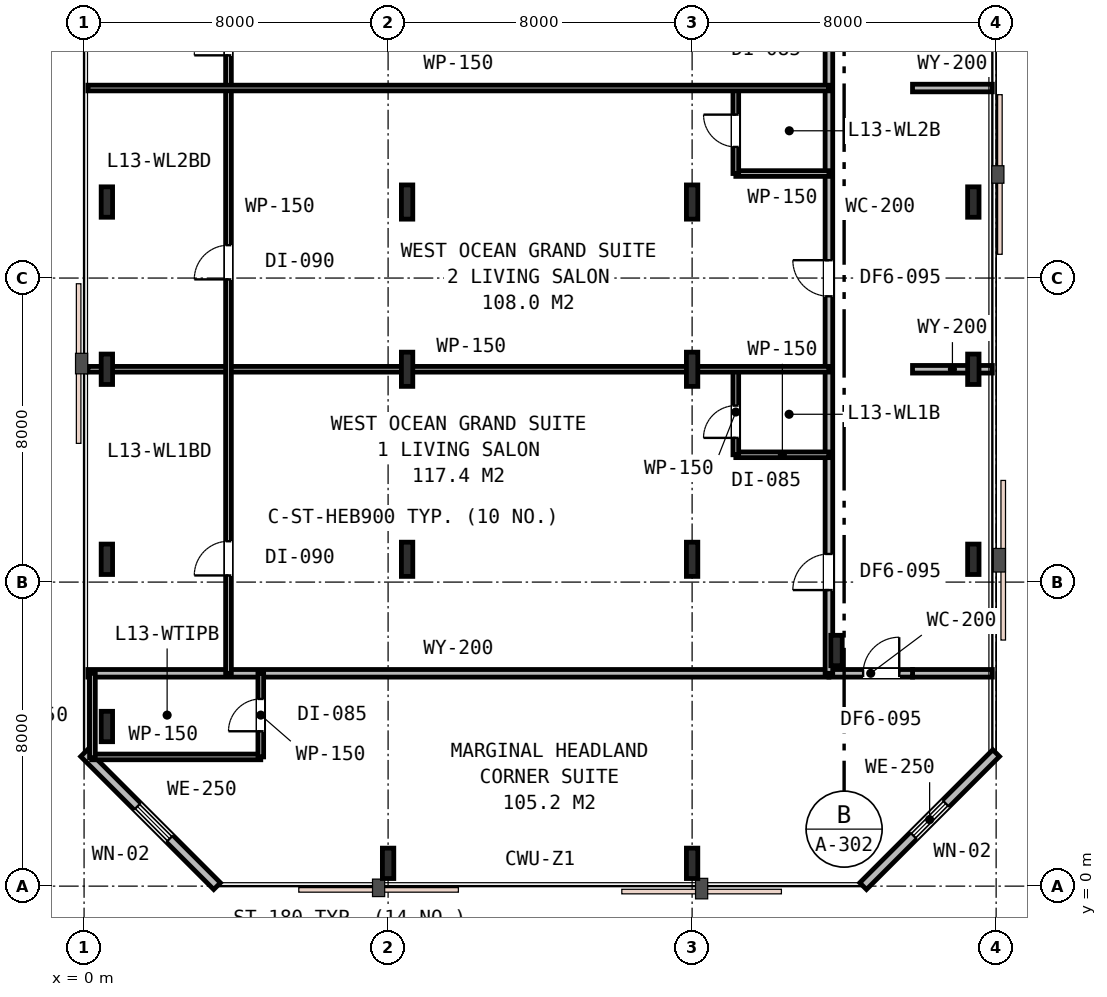
"""IFC4 building model, lengths in metres.
Left out: names, types, materials, properties, quantities, classifications, styles, units other than length and angle.
Written with IfcOpenShell. Run it as: python <this file> out.ifc"""

import sys

from ifc_helpers import new_model, si_unit, direction, frame, frame_2d, origin, origin_2d, place, context, subcontext, project, spatial, rectangle, i_section, extrude, element, fill, save


model = new_model("IFC4")
c1 = context("Model", 3, precision=1e-05, world=origin(), true_north=direction((0.0, 1.0)))
c2 = subcontext(c1, "Body", "Model", "MODEL_VIEW")
j1 = project(units=[si_unit("LENGTHUNIT", "METRE"), si_unit("PLANEANGLEUNIT", "RADIAN")], contexts=[c1])
p1 = place(None, origin())
s1 = spatial("IfcSite", under=j1, at=p1, CompositionType="ELEMENT")
p2 = place(p1, origin())
s2 = spatial("IfcBuilding", under=s1, at=p2, CompositionType="ELEMENT")
p3 = place(p2, frame((0.0, 0.0, 54.6)))
s3 = spatial("IfcBuildingStorey", under=s2, at=p3, CompositionType="ELEMENT", Elevation=54.6)
for number, where, z_axis, x_axis in (
    (1, (0.6, 8.6, 0.0), (0.0, 0.0, 1.0), (1.0, 0.0, 0.0)),
    (2, (0.6, 13.6, 0.0), (0.0, 0.0, 1.0), (1.0, 0.0, 0.0)),
    (3, (0.6, 18.0, 0.0), (0.0, 0.0, 1.0), (1.0, 0.0, 0.0)),
    (4, (0.6, 4.2, 0.0), (0.0, 0.0, 1.0), (1.0, 0.0, 0.0)),
    (5, (8.0, 0.6, 0.0), (0.0, 0.0, 1.0), (1.0, 0.0, 0.0)),
    (6, (16.0, 0.6, 0.0), (0.0, 0.0, 1.0), (1.0, 0.0, 0.0)),
    (7, (19.8, 6.2, 0.0), (0.0, 0.0, 1.0), (1.0, 0.0, 0.0)),
    (8, (23.4, 8.6, 0.0), (0.0, 0.0, 1.0), (1.0, 0.0, 0.0)),
    (9, (23.4, 13.6, 0.0), (0.0, 0.0, 1.0), (1.0, 0.0, 0.0)),
    (10, (23.4, 18.0, 0.0), (0.0, 0.0, 1.0), (1.0, 0.0, 0.0)),
):
    element("IfcColumn", number, at=place(p3, frame(where, z_axis=z_axis, x_axis=x_axis)), inside=s3, PredefinedType="COLUMN", context=c2, shape_type="SweptSolid", body=[
        extrude(i_section(OverallWidth=0.3, OverallDepth=0.8, WebThickness=0.018, FlangeThickness=0.033, FilletRadius=0.03, at=origin_2d()), origin(), (0.0, 0.0, 1.0), 3.6),
    ])
for number, where, z_axis, x_axis in (
    (11, (8.5, 8.6, 0.0), (0.0, 0.0, 1.0), (1.0, 0.0, 0.0)),
    (12, (16.0, 8.6, 0.0), (0.0, 0.0, 1.0), (1.0, 0.0, 0.0)),
    (13, (8.5, 13.6, 0.0), (0.0, 0.0, 1.0), (1.0, 0.0, 0.0)),
    (14, (16.0, 13.6, 0.0), (0.0, 0.0, 1.0), (1.0, 0.0, 0.0)),
    (15, (8.5, 18.0, 0.0), (0.0, 0.0, 1.0), (1.0, 0.0, 0.0)),
    (16, (16.0, 18.0, 0.0), (0.0, 0.0, 1.0), (1.0, 0.0, 0.0)),
):
    element("IfcColumn", number, at=place(p3, frame(where, z_axis=z_axis, x_axis=x_axis)), inside=s3, PredefinedType="COLUMN", context=c2, shape_type="SweptSolid", body=[
        extrude(i_section(OverallWidth=0.3, OverallDepth=0.9, WebThickness=0.018, FlangeThickness=0.035, FilletRadius=0.03, at=origin_2d()), origin(), (0.0, 0.0, 1.0), 3.6),
    ])
p4 = place(p3, frame((20.5, 0.0, 0.0), z_axis=(0.0, 0.0, 1.0), x_axis=(0.707106781187, 0.707106781187, 0.0)))
e17 = element("IfcWall", 17, at=p4, inside=s3, PredefinedType="STANDARD", context=c2, shape_type="SweptSolid", body=[
    extrude(rectangle(XDim=4.95, YDim=0.25, at=frame_2d((2.475, 0.0))), origin(), (0.0, 0.0, 1.0), 3.33),
])
p5 = place(p4, frame((1.875, 0.0, 0.85)))
e18 = element("IfcOpeningElement", 18, at=p5, cuts=e17, PredefinedType="OPENING", context=c2, shape_type="SweptSolid", body=[
    extrude(rectangle(XDim=1.2, YDim=1.6, at=frame_2d((0.6, 0.8))), frame((0.0, 0.135, 0.0), z_axis=(0.0, -1.0, 0.0), x_axis=(1.0, 0.0, 0.0)), (0.0, 0.0, 1.0), 0.27),
])
p6 = place(p3, frame((0.0, 3.5, 0.0), z_axis=(0.0, 0.0, 1.0), x_axis=(0.707106781187, -0.707106781187, 0.0)))
e19 = element("IfcWall", 19, at=p6, inside=s3, PredefinedType="STANDARD", context=c2, shape_type="SweptSolid", body=[
    extrude(rectangle(XDim=4.95, YDim=0.25, at=frame_2d((2.475, 0.0))), origin(), (0.0, 0.0, 1.0), 3.33),
])
p7 = place(p6, frame((1.985, 0.0, 0.85)))
e20 = element("IfcOpeningElement", 20, at=p7, cuts=e19, PredefinedType="OPENING", context=c2, shape_type="SweptSolid", body=[
    extrude(rectangle(XDim=1.2, YDim=1.6, at=frame_2d((0.6, 0.8))), frame((0.0, 0.135, 0.0), z_axis=(0.0, -1.0, 0.0), x_axis=(1.0, 0.0, 0.0)), (0.0, 0.0, 1.0), 0.27),
])
p8 = place(p3, frame((0.1, 5.6, 0.0), z_axis=(0.0, 0.0, 1.0), x_axis=(1.0, 0.0, 0.0)))
e21 = element("IfcWall", 21, at=p8, inside=s3, PredefinedType="PARTITIONING", context=c2, shape_type="SweptSolid", body=[
    extrude(rectangle(XDim=19.5, YDim=0.2, at=frame_2d((9.75, 0.0))), origin(), (0.0, 0.0, 1.0), 2.82),
])
p9 = place(p3, frame((21.8, 5.6, 0.0), z_axis=(0.0, 0.0, 1.0), x_axis=(1.0, 0.0, 0.0)))
e22 = element("IfcWall", 22, at=p9, inside=s3, PredefinedType="PARTITIONING", context=c2, shape_type="SweptSolid", body=[
    extrude(rectangle(XDim=2.1, YDim=0.2, at=frame_2d((1.05, 0.0))), origin(), (0.0, 0.0, 1.0), 3.33),
])
p10 = place(p3, frame((19.6, 5.6, 0.0), z_axis=(0.0, 0.0, 1.0), x_axis=(1.0, 0.0, 0.0)))
e23 = element("IfcWall", 23, at=p10, inside=s3, PredefinedType="PARTITIONING", context=c2, shape_type="SweptSolid", body=[
    extrude(rectangle(XDim=2.2, YDim=0.2, at=frame_2d((1.1, 0.0))), origin(), (0.0, 0.0, 1.0), 3.33),
])
p11 = place(p10, frame((0.9, 0.0, 0.0)))
e24 = element("IfcOpeningElement", 24, at=p11, cuts=e23, PredefinedType="OPENING", context=c2, shape_type="SweptSolid", body=[
    extrude(rectangle(XDim=0.95, YDim=2.15, at=frame_2d((0.475, 1.075))), frame((0.0, 0.11, 0.0), z_axis=(0.0, -1.0, 0.0), x_axis=(1.0, 0.0, 0.0)), (0.0, 0.0, 1.0), 0.22),
])
p12 = place(p3, frame((0.2, 3.4, 0.0), z_axis=(0.0, 0.0, 1.0), x_axis=(1.0, 0.0, 0.0)))
e25 = element("IfcWall", 25, at=p12, inside=s3, PredefinedType="PARTITIONING", context=c2, shape_type="SweptSolid", body=[
    extrude(rectangle(XDim=4.45, YDim=0.15, at=frame_2d((2.225, 0.0))), origin(), (0.0, 0.0, 1.0), 3.33),
])
p13 = place(p3, frame((4.65, 3.4, 0.0), z_axis=(0.0, 0.0, 1.0), x_axis=(0.0, 1.0, 0.0)))
e26 = element("IfcWall", 26, at=p13, inside=s3, PredefinedType="PARTITIONING", context=c2, shape_type="SweptSolid", body=[
    extrude(rectangle(XDim=2.2, YDim=0.15, at=frame_2d((1.1, 0.0))), origin(), (0.0, 0.0, 1.0), 3.33),
])
p14 = place(p13, frame((0.675, 0.0, 0.0)))
e27 = element("IfcOpeningElement", 27, at=p14, cuts=e26, PredefinedType="OPENING", context=c2, shape_type="SweptSolid", body=[
    extrude(rectangle(XDim=0.85, YDim=2.15, at=frame_2d((0.425, 1.075))), frame((0.0, 0.085, 0.0), z_axis=(0.0, -1.0, 0.0), x_axis=(1.0, 0.0, 0.0)), (0.0, 0.0, 1.0), 0.17),
])
p15 = place(p3, frame((0.22, 3.38, 0.0), z_axis=(0.0, 0.0, 1.0), x_axis=(0.0, 1.0, 0.0)))
e28 = element("IfcWall", 28, at=p15, inside=s3, PredefinedType="PARTITIONING", context=c2, shape_type="SweptSolid", body=[
    extrude(rectangle(XDim=2.22, YDim=0.15, at=frame_2d((1.11, 0.0))), origin(), (0.0, 0.0, 1.0), 2.93),
])
p16 = place(p3, frame((19.6, 5.6, 0.0), z_axis=(0.0, 0.0, 1.0), x_axis=(0.0, 1.0, 0.0)))
e29 = element("IfcWall", 29, at=p16, inside=s3, PredefinedType="PARTITIONING", context=c2, shape_type="SweptSolid", body=[
    extrude(rectangle(XDim=23.0, YDim=0.2, at=frame_2d((11.5, 0.0))), origin(), (0.0, 0.0, 1.0), 2.82),
])
p17 = place(p16, frame((2.19, 0.0, 0.0)))
e30 = element("IfcOpeningElement", 30, at=p17, cuts=e29, PredefinedType="OPENING", context=c2, shape_type="SweptSolid", body=[
    extrude(rectangle(XDim=0.95, YDim=2.15, at=frame_2d((0.475, 1.075))), frame((0.0, 0.11, 0.0), z_axis=(0.0, -1.0, 0.0), x_axis=(1.0, 0.0, 0.0)), (0.0, 0.0, 1.0), 0.22),
])
p18 = place(p16, frame((9.92, 0.0, 0.0)))
e31 = element("IfcOpeningElement", 31, at=p18, cuts=e29, PredefinedType="OPENING", context=c2, shape_type="SweptSolid", body=[
    extrude(rectangle(XDim=0.95, YDim=2.15, at=frame_2d((0.475, 1.075))), frame((0.0, 0.11, 0.0), z_axis=(0.0, -1.0, 0.0), x_axis=(1.0, 0.0, 0.0)), (0.0, 0.0, 1.0), 0.22),
])
p19 = place(p16, frame((17.41, 0.0, 0.0)))
e32 = element("IfcOpeningElement", 32, at=p19, cuts=e29, PredefinedType="OPENING", context=c2, shape_type="SweptSolid", body=[
    extrude(rectangle(XDim=0.95, YDim=2.15, at=frame_2d((0.475, 1.075))), frame((0.0, 0.11, 0.0), z_axis=(0.0, -1.0, 0.0), x_axis=(1.0, 0.0, 0.0)), (0.0, 0.0, 1.0), 0.22),
])
p20 = place(p3, frame((17.15, 11.35, 0.0), z_axis=(0.0, 0.0, 1.0), x_axis=(1.0, 0.0, 0.0)))
e33 = element("IfcWall", 33, at=p20, inside=s3, PredefinedType="PARTITIONING", context=c2, shape_type="SweptSolid", body=[
    extrude(rectangle(XDim=2.45, YDim=0.15, at=frame_2d((1.225, 0.0))), origin(), (0.0, 0.0, 1.0), 2.96),
])
p21 = place(p3, frame((17.15, 11.35, 0.0), z_axis=(0.0, 0.0, 1.0), x_axis=(0.0, 1.0, 0.0)))
e34 = element("IfcWall", 34, at=p21, inside=s3, PredefinedType="PARTITIONING", context=c2, shape_type="SweptSolid", body=[
    extrude(rectangle(XDim=2.25, YDim=0.15, at=frame_2d((1.125, 0.0))), origin(), (0.0, 0.0, 1.0), 2.82),
])
p22 = place(p21, frame((0.444, 0.0, 0.0)))
e35 = element("IfcOpeningElement", 35, at=p22, cuts=e34, PredefinedType="OPENING", context=c2, shape_type="SweptSolid", body=[
    extrude(rectangle(XDim=0.85, YDim=2.15, at=frame_2d((0.425, 1.075))), frame((0.0, 0.085, 0.0), z_axis=(0.0, -1.0, 0.0), x_axis=(1.0, 0.0, 0.0)), (0.0, 0.0, 1.0), 0.17),
])
p23 = place(p3, frame((0.1, 13.6, 0.0), z_axis=(0.0, 0.0, 1.0), x_axis=(1.0, 0.0, 0.0)))
e36 = element("IfcWall", 36, at=p23, inside=s3, PredefinedType="PARTITIONING", context=c2, shape_type="SweptSolid", body=[
    extrude(rectangle(XDim=19.5, YDim=0.15, at=frame_2d((9.75, 0.0))), origin(), (0.0, 0.0, 1.0), 2.82),
])
p24 = place(p3, frame((3.8, 5.6, 0.0), z_axis=(0.0, 0.0, 1.0), x_axis=(0.0, 1.0, 0.0)))
e37 = element("IfcWall", 37, at=p24, inside=s3, PredefinedType="PARTITIONING", context=c2, shape_type="SweptSolid", body=[
    extrude(rectangle(XDim=23.0, YDim=0.15, at=frame_2d((11.5, 0.0))), origin(), (0.0, 0.0, 1.0), 2.82),
])
p25 = place(p24, frame((2.575, 0.0, 0.0)))
e38 = element("IfcOpeningElement", 38, at=p25, cuts=e37, PredefinedType="OPENING", context=c2, shape_type="SweptSolid", body=[
    extrude(rectangle(XDim=0.9, YDim=2.15, at=frame_2d((0.45, 1.075))), frame((0.0, 0.085, 0.0), z_axis=(0.0, -1.0, 0.0), x_axis=(1.0, 0.0, 0.0)), (0.0, 0.0, 1.0), 0.17),
])
p26 = place(p24, frame((10.365, 0.0, 0.0)))
e39 = element("IfcOpeningElement", 39, at=p26, cuts=e37, PredefinedType="OPENING", context=c2, shape_type="SweptSolid", body=[
    extrude(rectangle(XDim=0.9, YDim=2.15, at=frame_2d((0.45, 1.075))), frame((0.0, 0.085, 0.0), z_axis=(0.0, -1.0, 0.0), x_axis=(1.0, 0.0, 0.0)), (0.0, 0.0, 1.0), 0.17),
])
p27 = place(p24, frame((16.26, 0.0, 0.0)))
e40 = element("IfcOpeningElement", 40, at=p27, cuts=e37, PredefinedType="OPENING", context=c2, shape_type="SweptSolid", body=[
    extrude(rectangle(XDim=0.9, YDim=2.15, at=frame_2d((0.45, 1.075))), frame((0.0, 0.085, 0.0), z_axis=(0.0, -1.0, 0.0), x_axis=(1.0, 0.0, 0.0)), (0.0, 0.0, 1.0), 0.17),
])
p28 = place(p3, frame((21.8, 13.6, 0.0), z_axis=(0.0, 0.0, 1.0), x_axis=(1.0, 0.0, 0.0)))
e41 = element("IfcWall", 41, at=p28, inside=s3, PredefinedType="PARTITIONING", context=c2, shape_type="SweptSolid", body=[
    extrude(rectangle(XDim=2.1, YDim=0.2, at=frame_2d((1.05, 0.0))), origin(), (0.0, 0.0, 1.0), 2.82),
])
p29 = place(p3, frame((17.15, 18.75, 0.0), z_axis=(0.0, 0.0, 1.0), x_axis=(1.0, 0.0, 0.0)))
e42 = element("IfcWall", 42, at=p29, inside=s3, PredefinedType="PARTITIONING", context=c2, shape_type="SweptSolid", body=[
    extrude(rectangle(XDim=2.45, YDim=0.15, at=frame_2d((1.225, 0.0))), origin(), (0.0, 0.0, 1.0), 3.33),
])
p30 = place(p3, frame((17.15, 18.75, 0.0), z_axis=(0.0, 0.0, 1.0), x_axis=(0.0, 1.0, 0.0)))
e43 = element("IfcWall", 43, at=p30, inside=s3, PredefinedType="PARTITIONING", context=c2, shape_type="SweptSolid", body=[
    extrude(rectangle(XDim=2.25, YDim=0.15, at=frame_2d((1.125, 0.0))), origin(), (0.0, 0.0, 1.0), 3.33),
])
p31 = place(p30, frame((0.7, 0.0, 0.0)))
e44 = element("IfcOpeningElement", 44, at=p31, cuts=e43, PredefinedType="OPENING", context=c2, shape_type="SweptSolid", body=[
    extrude(rectangle(XDim=0.85, YDim=2.15, at=frame_2d((0.425, 1.075))), frame((0.0, 0.085, 0.0), z_axis=(0.0, -1.0, 0.0), x_axis=(1.0, 0.0, 0.0)), (0.0, 0.0, 1.0), 0.17),
])
p32 = place(p3, frame((0.1, 21.0, 0.0), z_axis=(0.0, 0.0, 1.0), x_axis=(1.0, 0.0, 0.0)))
e45 = element("IfcWall", 45, at=p32, inside=s3, PredefinedType="PARTITIONING", context=c2, shape_type="SweptSolid", body=[
    extrude(rectangle(XDim=19.5, YDim=0.15, at=frame_2d((9.75, 0.0))), origin(), (0.0, 0.0, 1.0), 2.82),
])
p33 = place(p3, frame((21.8, 21.0, 0.0), z_axis=(0.0, 0.0, 1.0), x_axis=(1.0, 0.0, 0.0)))
e46 = element("IfcWall", 46, at=p33, inside=s3, PredefinedType="PARTITIONING", context=c2, shape_type="SweptSolid", body=[
    extrude(rectangle(XDim=2.1, YDim=0.2, at=frame_2d((1.05, 0.0))), origin(), (0.0, 0.0, 1.0), 3.33),
])
p34 = place(p5, origin())
e47 = element("IfcWindow", 47, at=p34, inside=s3, PartitioningType="SINGLE_PANEL", PredefinedType="WINDOW", context=c2, shape_type="SweptSolid", body=[
    extrude(rectangle(XDim=1.2, YDim=1.6, at=frame_2d((0.6, 0.8))), frame((0.0, 0.03, 0.0), z_axis=(0.0, -1.0, 0.0), x_axis=(1.0, 0.0, 0.0)), (0.0, 0.0, 1.0), 0.06),
])
fill(e18, e47)
p35 = place(p7, origin())
e48 = element("IfcWindow", 48, at=p35, inside=s3, PartitioningType="SINGLE_PANEL", PredefinedType="WINDOW", context=c2, shape_type="SweptSolid", body=[
    extrude(rectangle(XDim=1.2, YDim=1.6, at=frame_2d((0.6, 0.8))), frame((0.0, 0.03, 0.0), z_axis=(0.0, -1.0, 0.0), x_axis=(1.0, 0.0, 0.0)), (0.0, 0.0, 1.0), 0.06),
])
fill(e20, e48)
p36 = place(p11, origin())
e49 = element("IfcDoor", 49, at=p36, inside=s3, OperationType="SINGLE_SWING_RIGHT", PredefinedType="DOOR", context=c2, shape_type="SweptSolid", body=[
    extrude(rectangle(XDim=0.95, YDim=2.15, at=frame_2d((0.475, 1.075))), frame((0.0, 0.025, 0.0), z_axis=(0.0, -1.0, 0.0), x_axis=(1.0, 0.0, 0.0)), (0.0, 0.0, 1.0), 0.05),
])
fill(e24, e49)
p37 = place(p14, origin())
e50 = element("IfcDoor", 50, at=p37, inside=s3, OperationType="SINGLE_SWING_LEFT", PredefinedType="DOOR", context=c2, shape_type="SweptSolid", body=[
    extrude(rectangle(XDim=0.85, YDim=2.15, at=frame_2d((0.425, 1.075))), frame((0.0, 0.025, 0.0), z_axis=(0.0, -1.0, 0.0), x_axis=(1.0, 0.0, 0.0)), (0.0, 0.0, 1.0), 0.05),
])
fill(e27, e50)
p38 = place(p17, origin())
e51 = element("IfcDoor", 51, at=p38, inside=s3, OperationType="SINGLE_SWING_LEFT", PredefinedType="DOOR", context=c2, shape_type="SweptSolid", body=[
    extrude(rectangle(XDim=0.95, YDim=2.15, at=frame_2d((0.475, 1.075))), frame((0.0, 0.025, 0.0), z_axis=(0.0, -1.0, 0.0), x_axis=(1.0, 0.0, 0.0)), (0.0, 0.0, 1.0), 0.05),
])
fill(e30, e51)
p39 = place(p22, origin())
e52 = element("IfcDoor", 52, at=p39, inside=s3, OperationType="SINGLE_SWING_LEFT", PredefinedType="DOOR", context=c2, shape_type="SweptSolid", body=[
    extrude(rectangle(XDim=0.85, YDim=2.15, at=frame_2d((0.425, 1.075))), frame((0.0, 0.025, 0.0), z_axis=(0.0, -1.0, 0.0), x_axis=(1.0, 0.0, 0.0)), (0.0, 0.0, 1.0), 0.05),
])
fill(e35, e52)
p40 = place(p25, origin())
e53 = element("IfcDoor", 53, at=p40, inside=s3, OperationType="SINGLE_SWING_LEFT", PredefinedType="DOOR", context=c2, shape_type="SweptSolid", body=[
    extrude(rectangle(XDim=0.9, YDim=2.15, at=frame_2d((0.45, 1.075))), frame((0.0, 0.025, 0.0), z_axis=(0.0, -1.0, 0.0), x_axis=(1.0, 0.0, 0.0)), (0.0, 0.0, 1.0), 0.05),
])
fill(e38, e53)
p41 = place(p18, origin())
e54 = element("IfcDoor", 54, at=p41, inside=s3, OperationType="SINGLE_SWING_RIGHT", PredefinedType="DOOR", context=c2, shape_type="SweptSolid", body=[
    extrude(rectangle(XDim=0.95, YDim=2.15, at=frame_2d((0.475, 1.075))), frame((0.0, 0.025, 0.0), z_axis=(0.0, -1.0, 0.0), x_axis=(1.0, 0.0, 0.0)), (0.0, 0.0, 1.0), 0.05),
])
fill(e31, e54)
p42 = place(p31, origin())
e55 = element("IfcDoor", 55, at=p42, inside=s3, OperationType="SINGLE_SWING_RIGHT", PredefinedType="DOOR", context=c2, shape_type="SweptSolid", body=[
    extrude(rectangle(XDim=0.85, YDim=2.15, at=frame_2d((0.425, 1.075))), frame((0.0, 0.025, 0.0), z_axis=(0.0, -1.0, 0.0), x_axis=(1.0, 0.0, 0.0)), (0.0, 0.0, 1.0), 0.05),
])
fill(e44, e55)
p43 = place(p26, origin())
e56 = element("IfcDoor", 56, at=p43, inside=s3, OperationType="SINGLE_SWING_LEFT", PredefinedType="DOOR", context=c2, shape_type="SweptSolid", body=[
    extrude(rectangle(XDim=0.9, YDim=2.15, at=frame_2d((0.45, 1.075))), frame((0.0, 0.025, 0.0), z_axis=(0.0, -1.0, 0.0), x_axis=(1.0, 0.0, 0.0)), (0.0, 0.0, 1.0), 0.05),
])
fill(e39, e56)
p44 = place(p27, origin())
e57 = element("IfcDoor", 57, at=p44, inside=s3, OperationType="SINGLE_SWING_LEFT", PredefinedType="DOOR", context=c2, shape_type="SweptSolid", body=[
    extrude(rectangle(XDim=0.9, YDim=2.15, at=frame_2d((0.45, 1.075))), frame((0.0, 0.025, 0.0), z_axis=(0.0, -1.0, 0.0), x_axis=(1.0, 0.0, 0.0)), (0.0, 0.0, 1.0), 0.05),
])
fill(e40, e57)
save(model, sys.argv[1])
